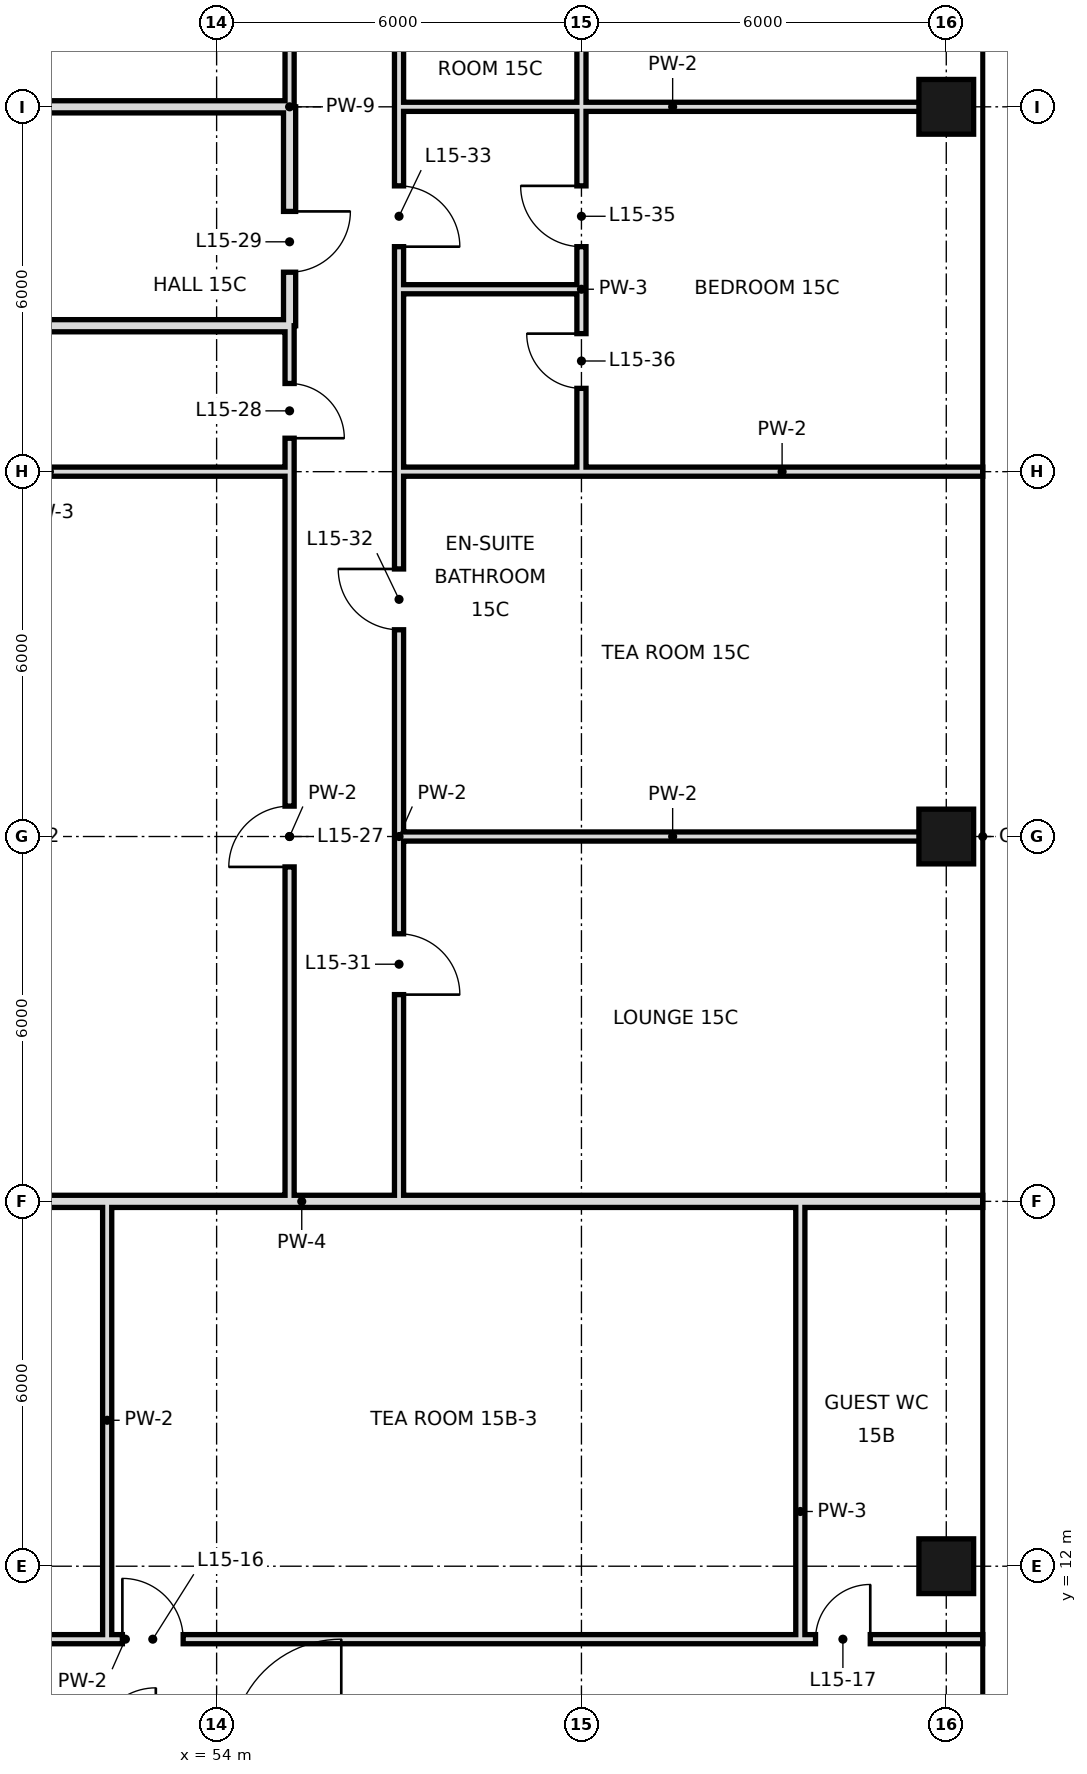
"""IFC4 building model, lengths in metres.
Left out: names, types, materials, properties, quantities, classifications, styles, units other than length and angle.
Written with IfcOpenShell. Run it as: python <this file> out.ifc"""

import sys

from ifc_helpers import new_model, si_unit, direction, frame, frame_2d, origin, origin_2d, place, context, subcontext, project, spatial, rectangle, hollow_rectangle, extrude, element, fill, save


model = new_model("IFC4")
c1 = context("Model", 3, precision=1e-05, world=origin(), true_north=direction((0.0, 1.0)))
c2 = subcontext(c1, "Body", "Model", "MODEL_VIEW")
j1 = project(units=[si_unit("LENGTHUNIT", "METRE"), si_unit("PLANEANGLEUNIT", "RADIAN")], contexts=[c1])
p1 = place(None, origin())
s1 = spatial("IfcSite", under=j1, at=p1, CompositionType="ELEMENT")
p2 = place(p1, origin())
s2 = spatial("IfcBuilding", under=s1, at=p2, CompositionType="ELEMENT")
p3 = place(p2, frame((0.0, 0.0, 75.0)))
s3 = spatial("IfcBuildingStorey", under=s2, at=p3, CompositionType="ELEMENT", Elevation=75.0)
for number, where, z_axis, x_axis in (
    (1, (66.0, 12.0, 0.0), (0.0, 0.0, 1.0), (1.0, 0.0, 0.0)),
    (2, (66.0, 24.0, 0.0), (0.0, 0.0, 1.0), (1.0, 0.0, 0.0)),
    (3, (66.0, 36.0, 0.0), (0.0, 0.0, 1.0), (1.0, 0.0, 0.0)),
):
    element("IfcColumn", number, at=place(p3, frame(where, z_axis=z_axis, x_axis=x_axis)), inside=s3, PredefinedType="COLUMN", context=c2, shape_type="SweptSolid", body=[
        extrude(hollow_rectangle(XDim=0.9, YDim=0.9, WallThickness=0.045, at=origin_2d()), origin(), (0.0, 0.0, 1.0), 3.6),
    ])
p4 = place(p3, frame((52.2, 10.8, 0.0), z_axis=(0.0, 0.0, 1.0), x_axis=(0.0, 1.0, 0.0)))
e4 = element("IfcWall", 4, at=p4, inside=s3, PredefinedType="PARTITIONING", context=c2, shape_type="SweptSolid", body=[
    extrude(rectangle(XDim=7.2, YDim=0.15, at=frame_2d((3.6, 0.0))), origin(), (0.0, 0.0, 1.0), 3.42),
])
p5 = place(p3, frame((55.2, 32.4, 0.0), z_axis=(0.0, 0.0, 1.0), x_axis=(0.0, 1.0, 0.0)))
e5 = element("IfcWall", 5, at=p5, inside=s3, PredefinedType="SOLIDWALL", context=c2, shape_type="SweptSolid", body=[
    extrude(rectangle(XDim=3.6, YDim=0.2, at=frame_2d((1.8, 0.0))), origin(), (0.0, 0.0, 1.0), 2.52),
])
p6 = place(p5, frame((0.88, 0.0, 0.0)))
e6 = element("IfcOpeningElement", 6, at=p6, cuts=e5, PredefinedType="OPENING", context=c2, shape_type="SweptSolid", body=[
    extrude(rectangle(XDim=1.0, YDim=2.4, at=frame_2d((0.5, 1.2))), frame((0.0, 0.11, 0.0), z_axis=(0.0, -1.0, 0.0), x_axis=(1.0, 0.0, 0.0)), (0.0, 0.0, 1.0), 0.22),
])
p7 = place(p3, frame((55.2, 18.0, 0.0), z_axis=(0.0, 0.0, 1.0), x_axis=(0.0, 1.0, 0.0)))
e7 = element("IfcWall", 7, at=p7, inside=s3, PredefinedType="PARTITIONING", context=c2, shape_type="SweptSolid", body=[
    extrude(rectangle(XDim=12.0, YDim=0.15, at=frame_2d((6.0, 0.0))), origin(), (0.0, 0.0, 1.0), 3.42),
])
p8 = place(p7, frame((5.5, 0.0, 0.0)))
e8 = element("IfcOpeningElement", 8, at=p8, cuts=e7, PredefinedType="OPENING", context=c2, shape_type="SweptSolid", body=[
    extrude(rectangle(XDim=1.0, YDim=2.4, at=frame_2d((0.5, 1.2))), frame((0.0, 0.085, 0.0), z_axis=(0.0, -1.0, 0.0), x_axis=(1.0, 0.0, 0.0)), (0.0, 0.0, 1.0), 0.17),
])
p9 = place(p3, frame((55.2, 36.0, 0.0), z_axis=(0.0, 0.0, 1.0), x_axis=(0.0, 1.0, 0.0)))
e9 = element("IfcWall", 9, at=p9, inside=s3, PredefinedType="PARTITIONING", context=c2, shape_type="SweptSolid", body=[
    extrude(rectangle(XDim=12.6, YDim=0.15, at=frame_2d((6.3, 0.0))), origin(), (0.0, 0.0, 1.0), 3.42),
])
p10 = place(p9, frame((2.56, 0.0, 0.0)))
e10 = element("IfcOpeningElement", 10, at=p10, cuts=e9, PredefinedType="OPENING", context=c2, shape_type="SweptSolid", body=[
    extrude(rectangle(XDim=1.0, YDim=2.4, at=frame_2d((0.5, 1.2))), frame((0.0, 0.085, 0.0), z_axis=(0.0, -1.0, 0.0), x_axis=(1.0, 0.0, 0.0)), (0.0, 0.0, 1.0), 0.17),
])
p11 = place(p9, frame((9.04, 0.0, 0.0)))
e11 = element("IfcOpeningElement", 11, at=p11, cuts=e9, PredefinedType="OPENING", context=c2, shape_type="SweptSolid", body=[
    extrude(rectangle(XDim=1.0, YDim=2.4, at=frame_2d((0.5, 1.2))), frame((0.0, 0.085, 0.0), z_axis=(0.0, -1.0, 0.0), x_axis=(1.0, 0.0, 0.0)), (0.0, 0.0, 1.0), 0.17),
])
p12 = place(p3, frame((55.2, 30.0, 0.0), z_axis=(0.0, 0.0, 1.0), x_axis=(0.0, 1.0, 0.0)))
e12 = element("IfcWall", 12, at=p12, inside=s3, PredefinedType="PARTITIONING", context=c2, shape_type="SweptSolid", body=[
    extrude(rectangle(XDim=2.4, YDim=0.15, at=frame_2d((1.2, 0.0))), origin(), (0.0, 0.0, 1.0), 3.42),
])
p13 = place(p12, frame((0.55, 0.0, 0.0)))
e13 = element("IfcOpeningElement", 13, at=p13, cuts=e12, PredefinedType="OPENING", context=c2, shape_type="SweptSolid", body=[
    extrude(rectangle(XDim=0.9, YDim=2.4, at=frame_2d((0.45, 1.2))), frame((0.0, 0.085, 0.0), z_axis=(0.0, -1.0, 0.0), x_axis=(1.0, 0.0, 0.0)), (0.0, 0.0, 1.0), 0.17),
])
p14 = place(p3, frame((57.0, 18.0, 0.0), z_axis=(0.0, 0.0, 1.0), x_axis=(0.0, 1.0, 0.0)))
e14 = element("IfcWall", 14, at=p14, inside=s3, PredefinedType="PARTITIONING", context=c2, shape_type="SweptSolid", body=[
    extrude(rectangle(XDim=12.0, YDim=0.15, at=frame_2d((6.0, 0.0))), origin(), (0.0, 0.0, 1.0), 3.42),
])
p15 = place(p14, frame((3.4, 0.0, 0.0)))
e15 = element("IfcOpeningElement", 15, at=p15, cuts=e14, PredefinedType="OPENING", context=c2, shape_type="SweptSolid", body=[
    extrude(rectangle(XDim=1.0, YDim=2.4, at=frame_2d((0.5, 1.2))), frame((0.0, 0.085, 0.0), z_axis=(0.0, -1.0, 0.0), x_axis=(1.0, 0.0, 0.0)), (0.0, 0.0, 1.0), 0.17),
])
p16 = place(p14, frame((9.4, 0.0, 0.0)))
e16 = element("IfcOpeningElement", 16, at=p16, cuts=e14, PredefinedType="OPENING", context=c2, shape_type="SweptSolid", body=[
    extrude(rectangle(XDim=1.0, YDim=2.4, at=frame_2d((0.5, 1.2))), frame((0.0, 0.085, 0.0), z_axis=(0.0, -1.0, 0.0), x_axis=(1.0, 0.0, 0.0)), (0.0, 0.0, 1.0), 0.17),
])
p17 = place(p3, frame((57.0, 33.0, 0.0), z_axis=(0.0, 0.0, 1.0), x_axis=(0.0, 1.0, 0.0)))
e17 = element("IfcWall", 17, at=p17, inside=s3, PredefinedType="PARTITIONING", context=c2, shape_type="SweptSolid", body=[
    extrude(rectangle(XDim=15.6, YDim=0.15, at=frame_2d((7.8, 0.0))), origin(), (0.0, 0.0, 1.0), 3.42),
])
p18 = place(p17, frame((0.7, 0.0, 0.0)))
e18 = element("IfcOpeningElement", 18, at=p18, cuts=e17, PredefinedType="OPENING", context=c2, shape_type="SweptSolid", body=[
    extrude(rectangle(XDim=1.0, YDim=2.4, at=frame_2d((0.5, 1.2))), frame((0.0, 0.085, 0.0), z_axis=(0.0, -1.0, 0.0), x_axis=(1.0, 0.0, 0.0)), (0.0, 0.0, 1.0), 0.17),
])
p19 = place(p17, frame((10.04, 0.0, 0.0)))
e19 = element("IfcOpeningElement", 19, at=p19, cuts=e17, PredefinedType="OPENING", context=c2, shape_type="SweptSolid", body=[
    extrude(rectangle(XDim=1.8, YDim=2.4, at=frame_2d((0.9, 1.2))), frame((0.0, 0.085, 0.0), z_axis=(0.0, -1.0, 0.0), x_axis=(1.0, 0.0, 0.0)), (0.0, 0.0, 1.0), 0.17),
])
p20 = place(p3, frame((57.0, 30.0, 0.0), z_axis=(0.0, 0.0, 1.0), x_axis=(0.0, 1.0, 0.0)))
e20 = element("IfcWall", 20, at=p20, inside=s3, PredefinedType="PARTITIONING", context=c2, shape_type="SweptSolid", body=[
    extrude(rectangle(XDim=3.0, YDim=0.15, at=frame_2d((1.5, 0.0))), origin(), (0.0, 0.0, 1.0), 3.42),
])
p21 = place(p3, frame((60.0, 33.0, 0.0), z_axis=(0.0, 0.0, 1.0), x_axis=(0.0, 1.0, 0.0)))
e21 = element("IfcWall", 21, at=p21, inside=s3, PredefinedType="PARTITIONING", context=c2, shape_type="SweptSolid", body=[
    extrude(rectangle(XDim=15.0, YDim=0.15, at=frame_2d((7.5, 0.0))), origin(), (0.0, 0.0, 1.0), 3.42),
])
p22 = place(p21, frame((0.7, 0.0, 0.0)))
e22 = element("IfcOpeningElement", 22, at=p22, cuts=e21, PredefinedType="OPENING", context=c2, shape_type="SweptSolid", body=[
    extrude(rectangle(XDim=1.0, YDim=2.4, at=frame_2d((0.5, 1.2))), frame((0.0, 0.085, 0.0), z_axis=(0.0, -1.0, 0.0), x_axis=(1.0, 0.0, 0.0)), (0.0, 0.0, 1.0), 0.17),
])
p23 = place(p21, frame((6.16, 0.0, 0.0)))
e23 = element("IfcOpeningElement", 23, at=p23, cuts=e21, PredefinedType="OPENING", context=c2, shape_type="SweptSolid", body=[
    extrude(rectangle(XDim=1.8, YDim=2.4, at=frame_2d((0.9, 1.2))), frame((0.0, 0.085, 0.0), z_axis=(0.0, -1.0, 0.0), x_axis=(1.0, 0.0, 0.0)), (0.0, 0.0, 1.0), 0.17),
])
p24 = place(p3, frame((60.0, 30.0, 0.0), z_axis=(0.0, 0.0, 1.0), x_axis=(0.0, 1.0, 0.0)))
e24 = element("IfcWall", 24, at=p24, inside=s3, PredefinedType="PARTITIONING", context=c2, shape_type="SweptSolid", body=[
    extrude(rectangle(XDim=3.0, YDim=0.15, at=frame_2d((1.5, 0.0))), origin(), (0.0, 0.0, 1.0), 3.42),
])
p25 = place(p24, frame((1.37, 0.0, 0.0)))
e25 = element("IfcOpeningElement", 25, at=p25, cuts=e24, PredefinedType="OPENING", context=c2, shape_type="SweptSolid", body=[
    extrude(rectangle(XDim=0.9, YDim=2.4, at=frame_2d((0.45, 1.2))), frame((0.0, 0.085, 0.0), z_axis=(0.0, -1.0, 0.0), x_axis=(1.0, 0.0, 0.0)), (0.0, 0.0, 1.0), 0.17),
])
p26 = place(p3, frame((63.6, 10.8, 0.0), z_axis=(0.0, 0.0, 1.0), x_axis=(0.0, 1.0, 0.0)))
e26 = element("IfcWall", 26, at=p26, inside=s3, PredefinedType="PARTITIONING", context=c2, shape_type="SweptSolid", body=[
    extrude(rectangle(XDim=7.2, YDim=0.15, at=frame_2d((3.6, 0.0))), origin(), (0.0, 0.0, 1.0), 3.42),
])
p27 = place(p3, frame((41.4, 10.8, 0.0), z_axis=(0.0, 0.0, 1.0), x_axis=(1.0, 0.0, 0.0)))
e27 = element("IfcWall", 27, at=p27, inside=s3, PredefinedType="PARTITIONING", context=c2, shape_type="SweptSolid", body=[
    extrude(rectangle(XDim=22.2, YDim=0.15, at=frame_2d((11.1, 0.0))), origin(), (0.0, 0.0, 1.0), 3.42),
])
p28 = place(p27, frame((4.9, 0.0, 0.0)))
e28 = element("IfcOpeningElement", 28, at=p28, cuts=e27, PredefinedType="OPENING", context=c2, shape_type="SweptSolid", body=[
    extrude(rectangle(XDim=1.0, YDim=2.4, at=frame_2d((0.5, 1.2))), frame((0.0, 0.085, 0.0), z_axis=(0.0, -1.0, 0.0), x_axis=(1.0, 0.0, 0.0)), (0.0, 0.0, 1.0), 0.17),
])
p29 = place(p27, frame((11.05, 0.0, 0.0)))
e29 = element("IfcOpeningElement", 29, at=p29, cuts=e27, PredefinedType="OPENING", context=c2, shape_type="SweptSolid", body=[
    extrude(rectangle(XDim=1.0, YDim=2.4, at=frame_2d((0.5, 1.2))), frame((0.0, 0.085, 0.0), z_axis=(0.0, -1.0, 0.0), x_axis=(1.0, 0.0, 0.0)), (0.0, 0.0, 1.0), 0.17),
])
p30 = place(p3, frame((63.6, 10.8, 0.0), z_axis=(0.0, 0.0, 1.0), x_axis=(1.0, 0.0, 0.0)))
e30 = element("IfcWall", 30, at=p30, inside=s3, PredefinedType="PARTITIONING", context=c2, shape_type="SweptSolid", body=[
    extrude(rectangle(XDim=3.0, YDim=0.15, at=frame_2d((1.5, 0.0))), origin(), (0.0, 0.0, 1.0), 3.42),
])
p31 = place(p30, frame((0.25, 0.0, 0.0)))
e31 = element("IfcOpeningElement", 31, at=p31, cuts=e30, PredefinedType="OPENING", context=c2, shape_type="SweptSolid", body=[
    extrude(rectangle(XDim=0.9, YDim=2.4, at=frame_2d((0.45, 1.2))), frame((0.0, 0.085, 0.0), z_axis=(0.0, -1.0, 0.0), x_axis=(1.0, 0.0, 0.0)), (0.0, 0.0, 1.0), 0.17),
])
p32 = place(p3, frame((44.9, 18.0, 0.0), z_axis=(0.0, 0.0, 1.0), x_axis=(1.0, 0.0, 0.0)))
e32 = element("IfcWall", 32, at=p32, inside=s3, PredefinedType="SOLIDWALL", context=c2, shape_type="SweptSolid", body=[
    extrude(rectangle(XDim=21.7, YDim=0.2, at=frame_2d((10.85, 0.0))), origin(), (0.0, 0.0, 1.0), 2.52),
])
p33 = place(p3, frame((57.0, 24.0, 0.0), z_axis=(0.0, 0.0, 1.0), x_axis=(1.0, 0.0, 0.0)))
e33 = element("IfcWall", 33, at=p33, inside=s3, PredefinedType="PARTITIONING", context=c2, shape_type="SweptSolid", body=[
    extrude(rectangle(XDim=9.0, YDim=0.15, at=frame_2d((4.5, 0.0))), origin(), (0.0, 0.0, 1.0), 2.52),
])
p34 = place(p3, frame((60.0, 30.0, 0.0), z_axis=(0.0, 0.0, 1.0), x_axis=(1.0, 0.0, 0.0)))
e34 = element("IfcWall", 34, at=p34, inside=s3, PredefinedType="PARTITIONING", context=c2, shape_type="SweptSolid", body=[
    extrude(rectangle(XDim=6.6, YDim=0.15, at=frame_2d((3.3, 0.0))), origin(), (0.0, 0.0, 1.0), 2.52),
])
p35 = place(p3, frame((44.9, 30.0, 0.0), z_axis=(0.0, 0.0, 1.0), x_axis=(1.0, 0.0, 0.0)))
e35 = element("IfcWall", 35, at=p35, inside=s3, PredefinedType="PARTITIONING", context=c2, shape_type="SweptSolid", body=[
    extrude(rectangle(XDim=10.3, YDim=0.15, at=frame_2d((5.15, 0.0))), origin(), (0.0, 0.0, 1.0), 2.52),
])
p36 = place(p3, frame((57.0, 30.0, 0.0), z_axis=(0.0, 0.0, 1.0), x_axis=(1.0, 0.0, 0.0)))
e36 = element("IfcWall", 36, at=p36, inside=s3, PredefinedType="PARTITIONING", context=c2, shape_type="SweptSolid", body=[
    extrude(rectangle(XDim=3.0, YDim=0.15, at=frame_2d((1.5, 0.0))), origin(), (0.0, 0.0, 1.0), 2.52),
])
p37 = place(p3, frame((44.9, 32.4, 0.0), z_axis=(0.0, 0.0, 1.0), x_axis=(1.0, 0.0, 0.0)))
e37 = element("IfcWall", 37, at=p37, inside=s3, PredefinedType="SOLIDWALL", context=c2, shape_type="SweptSolid", body=[
    extrude(rectangle(XDim=10.3, YDim=0.2, at=frame_2d((5.15, 0.0))), origin(), (0.0, 0.0, 1.0), 2.97),
])
p38 = place(p3, frame((57.0, 33.0, 0.0), z_axis=(0.0, 0.0, 1.0), x_axis=(1.0, 0.0, 0.0)))
e38 = element("IfcWall", 38, at=p38, inside=s3, PredefinedType="PARTITIONING", context=c2, shape_type="SweptSolid", body=[
    extrude(rectangle(XDim=3.0, YDim=0.15, at=frame_2d((1.5, 0.0))), origin(), (0.0, 0.0, 1.0), 3.42),
])
p39 = place(p3, frame((44.9, 36.0, 0.0), z_axis=(0.0, 0.0, 1.0), x_axis=(1.0, 0.0, 0.0)))
e39 = element("IfcWall", 39, at=p39, inside=s3, PredefinedType="SOLIDWALL", context=c2, shape_type="SweptSolid", body=[
    extrude(rectangle(XDim=10.3, YDim=0.2, at=frame_2d((5.15, 0.0))), origin(), (0.0, 0.0, 1.0), 2.52),
])
p40 = place(p3, frame((57.0, 36.0, 0.0), z_axis=(0.0, 0.0, 1.0), x_axis=(1.0, 0.0, 0.0)))
e40 = element("IfcWall", 40, at=p40, inside=s3, PredefinedType="PARTITIONING", context=c2, shape_type="SweptSolid", body=[
    extrude(rectangle(XDim=9.0, YDim=0.15, at=frame_2d((4.5, 0.0))), origin(), (0.0, 0.0, 1.0), 2.52),
])
p41 = place(p29, origin())
e41 = element("IfcDoor", 41, at=p41, inside=s3, OperationType="SINGLE_SWING_LEFT", PredefinedType="DOOR", context=c2, shape_type="SweptSolid", body=[
    extrude(rectangle(XDim=1.0, YDim=2.4, at=frame_2d((0.5, 1.2))), frame((0.0, 0.025, 0.0), z_axis=(0.0, -1.0, 0.0), x_axis=(1.0, 0.0, 0.0)), (0.0, 0.0, 1.0), 0.05),
])
fill(e29, e41)
p42 = place(p31, frame((0.9, 0.0, 0.0), z_axis=(0.0, 0.0, 1.0), x_axis=(-1.0, 0.0, 0.0)))
e42 = element("IfcDoor", 42, at=p42, inside=s3, OperationType="SINGLE_SWING_LEFT", PredefinedType="DOOR", context=c2, shape_type="SweptSolid", body=[
    extrude(rectangle(XDim=0.9, YDim=2.4, at=frame_2d((0.45, 1.2))), frame((0.0, 0.025, 0.0), z_axis=(0.0, -1.0, 0.0), x_axis=(1.0, 0.0, 0.0)), (0.0, 0.0, 1.0), 0.05),
])
fill(e31, e42)
p43 = place(p8, origin())
e43 = element("IfcDoor", 43, at=p43, inside=s3, OperationType="SINGLE_SWING_LEFT", PredefinedType="DOOR", context=c2, shape_type="SweptSolid", body=[
    extrude(rectangle(XDim=1.0, YDim=2.4, at=frame_2d((0.5, 1.2))), frame((0.0, 0.025, 0.0), z_axis=(0.0, -1.0, 0.0), x_axis=(1.0, 0.0, 0.0)), (0.0, 0.0, 1.0), 0.05),
])
fill(e8, e43)
p44 = place(p13, frame((0.9, 0.0, 0.0), z_axis=(0.0, 0.0, 1.0), x_axis=(-1.0, 0.0, 0.0)))
e44 = element("IfcDoor", 44, at=p44, inside=s3, OperationType="SINGLE_SWING_RIGHT", PredefinedType="DOOR", context=c2, shape_type="SweptSolid", body=[
    extrude(rectangle(XDim=0.9, YDim=2.4, at=frame_2d((0.45, 1.2))), frame((0.0, 0.025, 0.0), z_axis=(0.0, -1.0, 0.0), x_axis=(1.0, 0.0, 0.0)), (0.0, 0.0, 1.0), 0.05),
])
fill(e13, e44)
p45 = place(p6, origin())
e45 = element("IfcDoor", 45, at=p45, inside=s3, OperationType="SINGLE_SWING_RIGHT", PredefinedType="DOOR", context=c2, shape_type="SweptSolid", body=[
    extrude(rectangle(XDim=1.0, YDim=2.4, at=frame_2d((0.5, 1.2))), frame((0.0, 0.025, 0.0), z_axis=(0.0, -1.0, 0.0), x_axis=(1.0, 0.0, 0.0)), (0.0, 0.0, 1.0), 0.05),
])
fill(e6, e45)
p46 = place(p15, frame((1.0, 0.0, 0.0), z_axis=(0.0, 0.0, 1.0), x_axis=(-1.0, 0.0, 0.0)))
e46 = element("IfcDoor", 46, at=p46, inside=s3, OperationType="SINGLE_SWING_RIGHT", PredefinedType="DOOR", context=c2, shape_type="SweptSolid", body=[
    extrude(rectangle(XDim=1.0, YDim=2.4, at=frame_2d((0.5, 1.2))), frame((0.0, 0.025, 0.0), z_axis=(0.0, -1.0, 0.0), x_axis=(1.0, 0.0, 0.0)), (0.0, 0.0, 1.0), 0.05),
])
fill(e15, e46)
p47 = place(p16, frame((1.0, 0.0, 0.0), z_axis=(0.0, 0.0, 1.0), x_axis=(-1.0, 0.0, 0.0)))
e47 = element("IfcDoor", 47, at=p47, inside=s3, OperationType="SINGLE_SWING_LEFT", PredefinedType="DOOR", context=c2, shape_type="SweptSolid", body=[
    extrude(rectangle(XDim=1.0, YDim=2.4, at=frame_2d((0.5, 1.2))), frame((0.0, 0.025, 0.0), z_axis=(0.0, -1.0, 0.0), x_axis=(1.0, 0.0, 0.0)), (0.0, 0.0, 1.0), 0.05),
])
fill(e16, e47)
p48 = place(p18, frame((1.0, 0.0, 0.0), z_axis=(0.0, 0.0, 1.0), x_axis=(-1.0, 0.0, 0.0)))
e48 = element("IfcDoor", 48, at=p48, inside=s3, OperationType="SINGLE_SWING_RIGHT", PredefinedType="DOOR", context=c2, shape_type="SweptSolid", body=[
    extrude(rectangle(XDim=1.0, YDim=2.4, at=frame_2d((0.5, 1.2))), frame((0.0, 0.025, 0.0), z_axis=(0.0, -1.0, 0.0), x_axis=(1.0, 0.0, 0.0)), (0.0, 0.0, 1.0), 0.05),
])
fill(e18, e48)
p49 = place(p22, frame((1.0, 0.0, 0.0), z_axis=(0.0, 0.0, 1.0), x_axis=(-1.0, 0.0, 0.0)))
e49 = element("IfcDoor", 49, at=p49, inside=s3, OperationType="SINGLE_SWING_LEFT", PredefinedType="DOOR", context=c2, shape_type="SweptSolid", body=[
    extrude(rectangle(XDim=1.0, YDim=2.4, at=frame_2d((0.5, 1.2))), frame((0.0, 0.025, 0.0), z_axis=(0.0, -1.0, 0.0), x_axis=(1.0, 0.0, 0.0)), (0.0, 0.0, 1.0), 0.05),
])
fill(e22, e49)
p50 = place(p25, frame((0.9, 0.0, 0.0), z_axis=(0.0, 0.0, 1.0), x_axis=(-1.0, 0.0, 0.0)))
e50 = element("IfcDoor", 50, at=p50, inside=s3, OperationType="SINGLE_SWING_LEFT", PredefinedType="DOOR", context=c2, shape_type="SweptSolid", body=[
    extrude(rectangle(XDim=0.9, YDim=2.4, at=frame_2d((0.45, 1.2))), frame((0.0, 0.025, 0.0), z_axis=(0.0, -1.0, 0.0), x_axis=(1.0, 0.0, 0.0)), (0.0, 0.0, 1.0), 0.05),
])
fill(e25, e50)
save(model, sys.argv[1])
